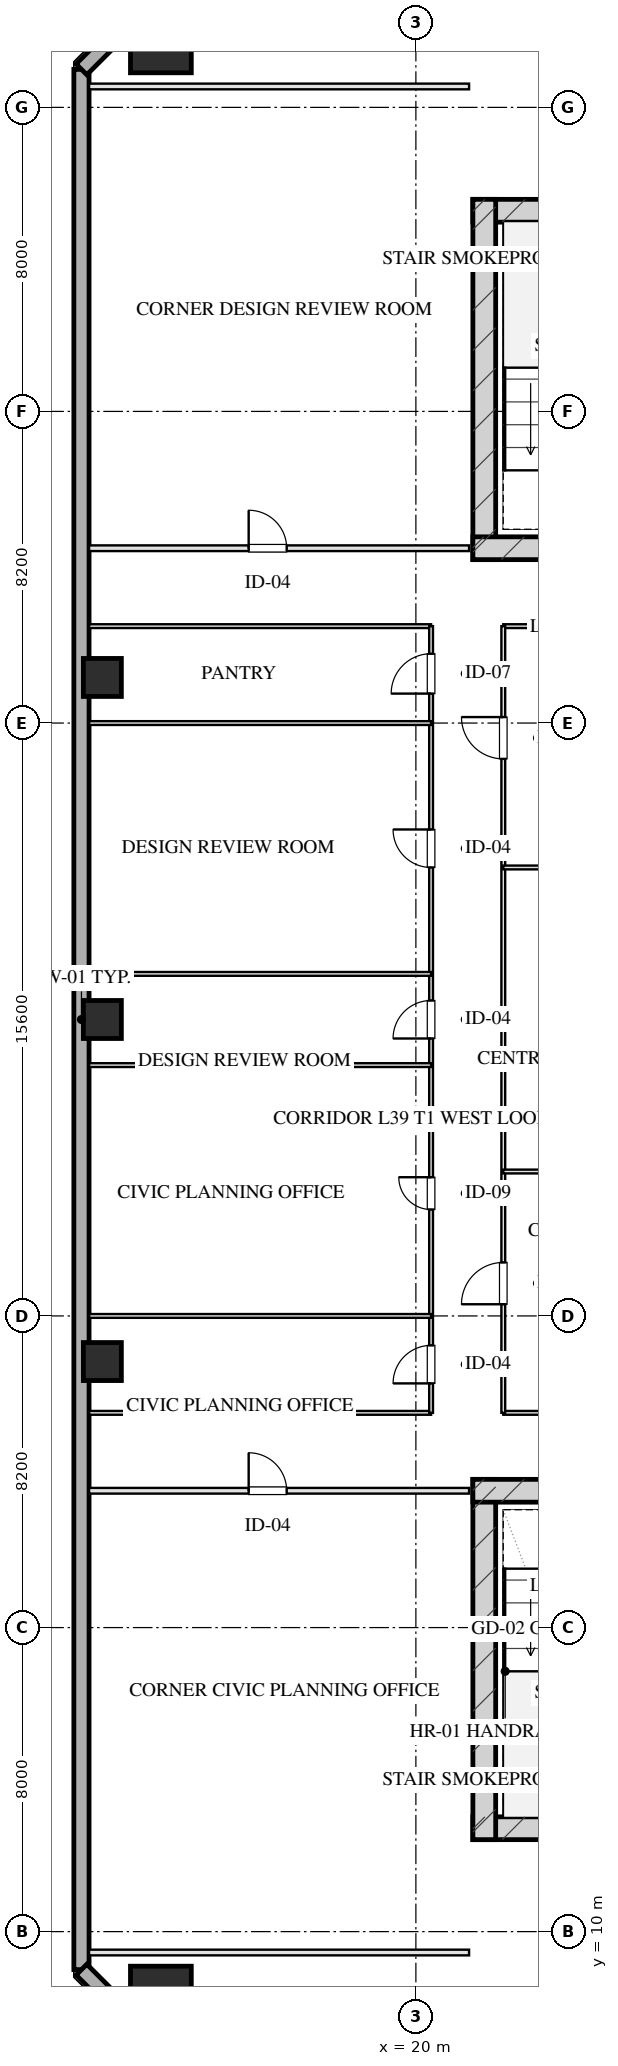
"""IFC4 building model, lengths in metres.
Left out: names, types, materials, properties, quantities, classifications, styles, units other than length and angle.
Written with IfcOpenShell. Run it as: python <this file> out.ifc"""

import sys

from ifc_helpers import new_model, si_unit, direction, frame, frame_2d, origin, origin_2d, place, context, subcontext, project, spatial, rectangle, hollow_rectangle, extrude, element, fill, save


model = new_model("IFC4")
c1 = context("Model", 3, precision=1e-05, world=origin(), true_north=direction((0.0, 1.0)))
c2 = subcontext(c1, "Body", "Model", "MODEL_VIEW")
j1 = project(units=[si_unit("LENGTHUNIT", "METRE"), si_unit("PLANEANGLEUNIT", "RADIAN")], contexts=[c1])
p1 = place(None, origin())
s1 = spatial("IfcSite", under=j1, at=p1, CompositionType="ELEMENT")
p2 = place(p1, origin())
s2 = spatial("IfcBuilding", under=s1, at=p2, CompositionType="ELEMENT")
p3 = place(p2, frame((0.0, 0.0, 149.5)))
s3 = spatial("IfcBuildingStorey", under=s2, at=p3, CompositionType="ELEMENT", Elevation=149.5)
p4 = place(p3, frame((21.5, 12.72, 0.0), z_axis=(0.0, 0.0, 1.0), x_axis=(1.0, 0.0, 0.0)))
e1 = element("IfcWall", 1, at=p4, inside=s3, PredefinedType="SHEAR", context=c2, shape_type="SweptSolid", body=[
    extrude(rectangle(XDim=17.0, YDim=0.6, at=frame_2d((8.5, 0.0))), origin(), (0.0, 0.0, 1.0), 3.45),
])
p5 = place(p3, frame((21.8, 21.9, 0.0), z_axis=(0.0, 0.0, 1.0), x_axis=(0.0, -1.0, 0.0)))
e2 = element("IfcWall", 2, at=p5, inside=s3, PredefinedType="SHEAR", context=c2, shape_type="SweptSolid", body=[
    extrude(rectangle(XDim=9.48, YDim=0.6, at=frame_2d((4.74, 0.0))), origin(), (0.0, 0.0, 1.0), 3.45),
])
p6 = place(p3, frame((21.5, 21.6, 0.0), z_axis=(0.0, 0.0, 1.0), x_axis=(1.0, 0.0, 0.0)))
e3 = element("IfcWall", 3, at=p6, inside=s3, PredefinedType="SHEAR", context=c2, shape_type="SweptSolid", body=[
    extrude(rectangle(XDim=4.22, YDim=0.6, at=frame_2d((2.11, 0.0))), origin(), (0.0, 0.0, 1.0), 3.45),
])
p7 = place(p3, frame((21.5, 55.28, 0.0), z_axis=(0.0, 0.0, 1.0), x_axis=(1.0, 0.0, 0.0)))
e4 = element("IfcWall", 4, at=p7, inside=s3, PredefinedType="SHEAR", context=c2, shape_type="SweptSolid", body=[
    extrude(rectangle(XDim=17.0, YDim=0.6, at=frame_2d((8.5, 0.0))), origin(), (0.0, 0.0, 1.0), 3.45),
])
p8 = place(p3, frame((21.8, 46.1, 0.0), z_axis=(0.0, 0.0, 1.0), x_axis=(0.0, 1.0, 0.0)))
e5 = element("IfcWall", 5, at=p8, inside=s3, PredefinedType="SHEAR", context=c2, shape_type="SweptSolid", body=[
    extrude(rectangle(XDim=9.48, YDim=0.6, at=frame_2d((4.74, 0.0))), origin(), (0.0, 0.0, 1.0), 3.45),
])
p9 = place(p3, frame((21.5, 46.4, 0.0), z_axis=(0.0, 0.0, 1.0), x_axis=(1.0, 0.0, 0.0)))
e6 = element("IfcWall", 6, at=p9, inside=s3, PredefinedType="SHEAR", context=c2, shape_type="SweptSolid", body=[
    extrude(rectangle(XDim=4.22, YDim=0.6, at=frame_2d((2.11, 0.0))), origin(), (0.0, 0.0, 1.0), 3.45),
])
for number, where, z_axis, x_axis in (
    (7, (13.29, 8.29, 0.0), (0.0, 0.0, 1.0), (1.0, 0.0, 0.0)),
    (8, (13.29, 59.71, 0.0), (0.0, 0.0, 1.0), (1.0, 0.0, 0.0)),
):
    element("IfcColumn", number, at=place(p3, frame(where, z_axis=z_axis, x_axis=x_axis)), inside=s3, PredefinedType="COLUMN", context=c2, shape_type="SweptSolid", body=[
        extrude(hollow_rectangle(XDim=1.6, YDim=1.6, WallThickness=0.055, at=origin_2d()), origin(), (0.0, 0.0, 1.0), 3.451),
    ])
for number, where, z_axis, x_axis in (
    (9, (11.75, 25.0, 0.0), (0.0, 0.0, 1.0), (1.0, 0.0, 0.0)),
    (10, (11.75, 34.0, 0.0), (0.0, 0.0, 1.0), (1.0, 0.0, 0.0)),
    (11, (11.75, 43.0, 0.0), (0.0, 0.0, 1.0), (1.0, 0.0, 0.0)),
):
    element("IfcColumn", number, at=place(p3, frame(where, z_axis=z_axis, x_axis=x_axis)), inside=s3, PredefinedType="COLUMN", context=c2, shape_type="SweptSolid", body=[
        extrude(hollow_rectangle(XDim=1.0, YDim=1.0, WallThickness=0.036, at=origin_2d()), origin(), (0.0, 0.0, 1.0), 3.451),
    ])
p10 = place(p3, frame((11.2, 9.0, 0.0), z_axis=(0.0, 0.0, 1.0), x_axis=(0.0, 1.0, 0.0)))
e12 = element("IfcWall", 12, at=p10, inside=s3, PredefinedType="SOLIDWALL", context=c2, shape_type="SweptSolid", body=[
    extrude(rectangle(XDim=50.0, YDim=0.4, at=frame_2d((25.0, 0.0))), origin(), (0.0, 0.0, 1.0), 2.61),
])
for number, where, z_axis, x_axis in (
    (13, (11.2, 59.0, 0.0), (0.0, 0.0, 1.0), (0.707, 0.707, 0.0)),
    (14, (14.0, 6.2, 0.0), (0.0, 0.0, 1.0), (-0.707, 0.707, 0.0)),
):
    element("IfcWall", number, at=place(p3, frame(where, z_axis=z_axis, x_axis=x_axis)), inside=s3, PredefinedType="SOLIDWALL", context=c2, shape_type="SweptSolid", body=[
        extrude(rectangle(XDim=3.96, YDim=0.4, at=frame_2d((1.98, 0.0))), origin(), (0.0, 0.0, 1.0), 2.61),
    ])
p11 = place(p3, frame((11.4, 9.45, 0.0), z_axis=(0.0, 0.0, 1.0), x_axis=(1.0, 0.0, 0.0)))
e15 = element("IfcWall", 15, at=p11, inside=s3, PredefinedType="PARTITIONING", context=c2, shape_type="SweptSolid", body=[
    extrude(rectangle(XDim=10.0, YDim=0.15, at=frame_2d((5.0, 0.0))), origin(), (0.0, 0.0, 1.0), 3.175),
])
p12 = place(p3, frame((11.4, 21.6, 0.0), z_axis=(0.0, 0.0, 1.0), x_axis=(1.0, 0.0, 0.0)))
e16 = element("IfcWall", 16, at=p12, inside=s3, PredefinedType="PARTITIONING", context=c2, shape_type="SweptSolid", body=[
    extrude(rectangle(XDim=10.0, YDim=0.15, at=frame_2d((5.0, 0.0))), origin(), (0.0, 0.0, 1.0), 3.175),
])
p13 = place(p12, frame((4.2, 0.0, 0.0)))
e17 = element("IfcOpeningElement", 17, at=p13, cuts=e16, PredefinedType="OPENING", context=c2, shape_type="SweptSolid", body=[
    extrude(rectangle(XDim=1.0, YDim=2.05, at=frame_2d((0.5, 1.025))), frame((0.0, 0.085, 0.0), z_axis=(0.0, -1.0, 0.0), x_axis=(1.0, 0.0, 0.0)), (0.0, 0.0, 1.0), 0.17),
])
p14 = place(p3, frame((11.4, 58.55, 0.0), z_axis=(0.0, 0.0, 1.0), x_axis=(1.0, 0.0, 0.0)))
e18 = element("IfcWall", 18, at=p14, inside=s3, PredefinedType="PARTITIONING", context=c2, shape_type="SweptSolid", body=[
    extrude(rectangle(XDim=10.0, YDim=0.15, at=frame_2d((5.0, 0.0))), origin(), (0.0, 0.0, 1.0), 3.175),
])
p15 = place(p3, frame((11.4, 46.4, 0.0), z_axis=(0.0, 0.0, 1.0), x_axis=(1.0, 0.0, 0.0)))
e19 = element("IfcWall", 19, at=p15, inside=s3, PredefinedType="PARTITIONING", context=c2, shape_type="SweptSolid", body=[
    extrude(rectangle(XDim=10.0, YDim=0.15, at=frame_2d((5.0, 0.0))), origin(), (0.0, 0.0, 1.0), 3.175),
])
p16 = place(p15, frame((4.2, 0.0, 0.0)))
e20 = element("IfcOpeningElement", 20, at=p16, cuts=e19, PredefinedType="OPENING", context=c2, shape_type="SweptSolid", body=[
    extrude(rectangle(XDim=1.0, YDim=2.05, at=frame_2d((0.5, 1.025))), frame((0.0, 0.085, 0.0), z_axis=(0.0, -1.0, 0.0), x_axis=(1.0, 0.0, 0.0)), (0.0, 0.0, 1.0), 0.17),
])
p17 = place(p3, frame((11.4, 23.65, 0.0), z_axis=(0.0, 0.0, 1.0), x_axis=(1.0, 0.0, 0.0)))
e21 = element("IfcWall", 21, at=p17, inside=s3, PredefinedType="MOVABLE", context=c2, shape_type="SweptSolid", body=[
    extrude(rectangle(XDim=9.0, YDim=0.1, at=frame_2d((4.5, 0.0))), origin(), (0.0, 0.0, 1.0), 3.175),
])
p18 = place(p3, frame((22.3, 23.65, 0.0), z_axis=(0.0, 0.0, 1.0), x_axis=(1.0, 0.0, 0.0)))
e22 = element("IfcWall", 22, at=p18, inside=s3, PredefinedType="MOVABLE", context=c2, shape_type="SweptSolid", body=[
    extrude(rectangle(XDim=8.95, YDim=0.1, at=frame_2d((4.475, 0.0))), origin(), (0.0, 0.0, 1.0), 3.175),
])
p19 = place(p3, frame((11.4, 44.35, 0.0), z_axis=(0.0, 0.0, 1.0), x_axis=(1.0, 0.0, 0.0)))
e23 = element("IfcWall", 23, at=p19, inside=s3, PredefinedType="MOVABLE", context=c2, shape_type="SweptSolid", body=[
    extrude(rectangle(XDim=9.0, YDim=0.1, at=frame_2d((4.5, 0.0))), origin(), (0.0, 0.0, 1.0), 3.175),
])
p20 = place(p3, frame((22.3, 44.35, 0.0), z_axis=(0.0, 0.0, 1.0), x_axis=(1.0, 0.0, 0.0)))
e24 = element("IfcWall", 24, at=p20, inside=s3, PredefinedType="MOVABLE", context=c2, shape_type="SweptSolid", body=[
    extrude(rectangle(XDim=8.95, YDim=0.1, at=frame_2d((4.475, 0.0))), origin(), (0.0, 0.0, 1.0), 3.175),
])
p21 = place(p3, frame((20.4, 23.65, 0.0), z_axis=(0.0, 0.0, 1.0), x_axis=(0.0, 1.0, 0.0)))
e25 = element("IfcWall", 25, at=p21, inside=s3, PredefinedType="MOVABLE", context=c2, shape_type="SweptSolid", body=[
    extrude(rectangle(XDim=20.7, YDim=0.1, at=frame_2d((10.35, 0.0))), origin(), (0.0, 0.0, 1.0), 3.175),
])
p22 = place(p21, frame((0.775, 0.0, 0.0)))
e26 = element("IfcOpeningElement", 26, at=p22, cuts=e25, PredefinedType="OPENING", context=c2, shape_type="SweptSolid", body=[
    extrude(rectangle(XDim=1.0, YDim=2.05, at=frame_2d((0.5, 1.025))), frame((0.0, 0.06, 0.0), z_axis=(0.0, -1.0, 0.0), x_axis=(1.0, 0.0, 0.0)), (0.0, 0.0, 1.0), 0.12),
])
p23 = place(p21, frame((5.35, 0.0, 0.0)))
e27 = element("IfcOpeningElement", 27, at=p23, cuts=e25, PredefinedType="OPENING", context=c2, shape_type="SweptSolid", body=[
    extrude(rectangle(XDim=0.85, YDim=2.05, at=frame_2d((0.425, 1.025))), frame((0.0, 0.06, 0.0), z_axis=(0.0, -1.0, 0.0), x_axis=(1.0, 0.0, 0.0)), (0.0, 0.0, 1.0), 0.12),
])
p24 = place(p21, frame((9.85, 0.0, 0.0)))
e28 = element("IfcOpeningElement", 28, at=p24, cuts=e25, PredefinedType="OPENING", context=c2, shape_type="SweptSolid", body=[
    extrude(rectangle(XDim=1.0, YDim=2.05, at=frame_2d((0.5, 1.025))), frame((0.0, 0.06, 0.0), z_axis=(0.0, -1.0, 0.0), x_axis=(1.0, 0.0, 0.0)), (0.0, 0.0, 1.0), 0.12),
])
p25 = place(p21, frame((14.35, 0.0, 0.0)))
e29 = element("IfcOpeningElement", 29, at=p25, cuts=e25, PredefinedType="OPENING", context=c2, shape_type="SweptSolid", body=[
    extrude(rectangle(XDim=1.0, YDim=2.05, at=frame_2d((0.5, 1.025))), frame((0.0, 0.06, 0.0), z_axis=(0.0, -1.0, 0.0), x_axis=(1.0, 0.0, 0.0)), (0.0, 0.0, 1.0), 0.12),
])
p26 = place(p21, frame((18.925, 0.0, 0.0)))
e30 = element("IfcOpeningElement", 30, at=p26, cuts=e25, PredefinedType="OPENING", context=c2, shape_type="SweptSolid", body=[
    extrude(rectangle(XDim=1.05, YDim=2.05, at=frame_2d((0.525, 1.025))), frame((0.0, 0.06, 0.0), z_axis=(0.0, -1.0, 0.0), x_axis=(1.0, 0.0, 0.0)), (0.0, 0.0, 1.0), 0.12),
])
p27 = place(p3, frame((22.3, 23.65, 0.0), z_axis=(0.0, 0.0, 1.0), x_axis=(0.0, 1.0, 0.0)))
e31 = element("IfcWall", 31, at=p27, inside=s3, PredefinedType="MOVABLE", context=c2, shape_type="SweptSolid", body=[
    extrude(rectangle(XDim=20.7, YDim=0.1, at=frame_2d((10.35, 0.0))), origin(), (0.0, 0.0, 1.0), 3.175),
])
p28 = place(p27, frame((2.857, 0.0, 0.0)))
e32 = element("IfcOpeningElement", 32, at=p28, cuts=e31, PredefinedType="OPENING", context=c2, shape_type="SweptSolid", body=[
    extrude(rectangle(XDim=1.1, YDim=2.05, at=frame_2d((0.55, 1.025))), frame((0.0, 0.06, 0.0), z_axis=(0.0, -1.0, 0.0), x_axis=(1.0, 0.0, 0.0)), (0.0, 0.0, 1.0), 0.12),
])
p29 = place(p27, frame((17.208, 0.0, 0.0)))
e33 = element("IfcOpeningElement", 33, at=p29, cuts=e31, PredefinedType="OPENING", context=c2, shape_type="SweptSolid", body=[
    extrude(rectangle(XDim=1.1, YDim=2.05, at=frame_2d((0.55, 1.025))), frame((0.0, 0.06, 0.0), z_axis=(0.0, -1.0, 0.0), x_axis=(1.0, 0.0, 0.0)), (0.0, 0.0, 1.0), 0.12),
])
for number, where, z_axis, x_axis in (
    (34, (22.3, 30.0, 0.0), (0.0, 0.0, 1.0), (1.0, 0.0, 0.0)),
    (35, (22.3, 38.0, 0.0), (0.0, 0.0, 1.0), (1.0, 0.0, 0.0)),
):
    element("IfcWall", number, at=place(p3, frame(where, z_axis=z_axis, x_axis=x_axis)), inside=s3, PredefinedType="MOVABLE", context=c2, shape_type="SweptSolid", body=[
        extrude(rectangle(XDim=8.95, YDim=0.1, at=frame_2d((4.475, 0.0))), origin(), (0.0, 0.0, 1.0), 3.175),
    ])
for number, where, z_axis, x_axis in (
    (36, (11.4, 26.2, 0.0), (0.0, 0.0, 1.0), (1.0, 0.0, 0.0)),
    (37, (11.4, 32.8, 0.0), (0.0, 0.0, 1.0), (1.0, 0.0, 0.0)),
    (38, (11.4, 35.2, 0.0), (0.0, 0.0, 1.0), (1.0, 0.0, 0.0)),
    (39, (11.4, 41.8, 0.0), (0.0, 0.0, 1.0), (1.0, 0.0, 0.0)),
):
    element("IfcWall", number, at=place(p3, frame(where, z_axis=z_axis, x_axis=x_axis)), inside=s3, PredefinedType="MOVABLE", context=c2, shape_type="SweptSolid", body=[
        extrude(rectangle(XDim=9.0, YDim=0.1, at=frame_2d((4.5, 0.0))), origin(), (0.0, 0.0, 1.0), 3.175),
    ])
p30 = place(p13, origin())
e40 = element("IfcDoor", 40, at=p30, inside=s3, OperationType="SINGLE_SWING_LEFT", PredefinedType="DOOR", context=c2, shape_type="SweptSolid", body=[
    extrude(rectangle(XDim=1.0, YDim=2.05, at=frame_2d((0.5, 1.025))), frame((0.0, 0.025, 0.0), z_axis=(0.0, -1.0, 0.0), x_axis=(1.0, 0.0, 0.0)), (0.0, 0.0, 1.0), 0.05),
])
fill(e17, e40)
p31 = place(p16, origin())
e41 = element("IfcDoor", 41, at=p31, inside=s3, OperationType="SINGLE_SWING_LEFT", PredefinedType="DOOR", context=c2, shape_type="SweptSolid", body=[
    extrude(rectangle(XDim=1.0, YDim=2.05, at=frame_2d((0.5, 1.025))), frame((0.0, 0.025, 0.0), z_axis=(0.0, -1.0, 0.0), x_axis=(1.0, 0.0, 0.0)), (0.0, 0.0, 1.0), 0.05),
])
fill(e20, e41)
p32 = place(p22, origin())
e42 = element("IfcDoor", 42, at=p32, inside=s3, OperationType="SINGLE_SWING_LEFT", PredefinedType="DOOR", context=c2, shape_type="SweptSolid", body=[
    extrude(rectangle(XDim=1.0, YDim=2.05, at=frame_2d((0.5, 1.025))), frame((0.0, 0.025, 0.0), z_axis=(0.0, -1.0, 0.0), x_axis=(1.0, 0.0, 0.0)), (0.0, 0.0, 1.0), 0.05),
])
fill(e26, e42)
p33 = place(p23, origin())
e43 = element("IfcDoor", 43, at=p33, inside=s3, OperationType="SINGLE_SWING_RIGHT", PredefinedType="DOOR", context=c2, shape_type="SweptSolid", body=[
    extrude(rectangle(XDim=0.85, YDim=2.05, at=frame_2d((0.425, 1.025))), frame((0.0, 0.025, 0.0), z_axis=(0.0, -1.0, 0.0), x_axis=(1.0, 0.0, 0.0)), (0.0, 0.0, 1.0), 0.05),
])
fill(e27, e43)
p34 = place(p24, origin())
e44 = element("IfcDoor", 44, at=p34, inside=s3, OperationType="SINGLE_SWING_LEFT", PredefinedType="DOOR", context=c2, shape_type="SweptSolid", body=[
    extrude(rectangle(XDim=1.0, YDim=2.05, at=frame_2d((0.5, 1.025))), frame((0.0, 0.025, 0.0), z_axis=(0.0, -1.0, 0.0), x_axis=(1.0, 0.0, 0.0)), (0.0, 0.0, 1.0), 0.05),
])
fill(e28, e44)
p35 = place(p25, origin())
e45 = element("IfcDoor", 45, at=p35, inside=s3, OperationType="SINGLE_SWING_RIGHT", PredefinedType="DOOR", context=c2, shape_type="SweptSolid", body=[
    extrude(rectangle(XDim=1.0, YDim=2.05, at=frame_2d((0.5, 1.025))), frame((0.0, 0.025, 0.0), z_axis=(0.0, -1.0, 0.0), x_axis=(1.0, 0.0, 0.0)), (0.0, 0.0, 1.0), 0.05),
])
fill(e29, e45)
p36 = place(p26, origin())
e46 = element("IfcDoor", 46, at=p36, inside=s3, OperationType="SINGLE_SWING_LEFT", PredefinedType="DOOR", context=c2, shape_type="SweptSolid", body=[
    extrude(rectangle(XDim=1.05, YDim=2.05, at=frame_2d((0.525, 1.025))), frame((0.0, 0.025, 0.0), z_axis=(0.0, -1.0, 0.0), x_axis=(1.0, 0.0, 0.0)), (0.0, 0.0, 1.0), 0.05),
])
fill(e30, e46)
p37 = place(p28, origin())
e47 = element("IfcDoor", 47, at=p37, inside=s3, OperationType="SINGLE_SWING_LEFT", PredefinedType="DOOR", context=c2, shape_type="SweptSolid", body=[
    extrude(rectangle(XDim=1.1, YDim=2.05, at=frame_2d((0.55, 1.025))), frame((0.0, 0.025, 0.0), z_axis=(0.0, -1.0, 0.0), x_axis=(1.0, 0.0, 0.0)), (0.0, 0.0, 1.0), 0.05),
])
fill(e32, e47)
p38 = place(p29, origin())
e48 = element("IfcDoor", 48, at=p38, inside=s3, OperationType="SINGLE_SWING_RIGHT", PredefinedType="DOOR", context=c2, shape_type="SweptSolid", body=[
    extrude(rectangle(XDim=1.1, YDim=2.05, at=frame_2d((0.55, 1.025))), frame((0.0, 0.025, 0.0), z_axis=(0.0, -1.0, 0.0), x_axis=(1.0, 0.0, 0.0)), (0.0, 0.0, 1.0), 0.05),
])
fill(e33, e48)
save(model, sys.argv[1])
